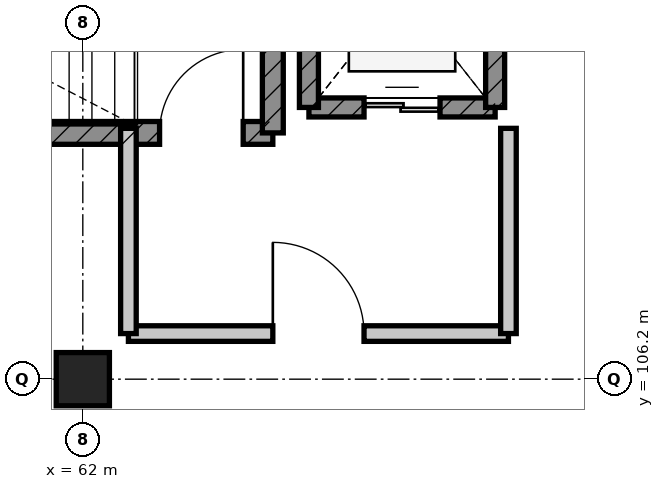
"""IFC4 building model, lengths in metres.
Left out: names, types, materials, properties, quantities, classifications, styles, units other than length and angle.
Written with IfcOpenShell. Run it as: python <this file> out.ifc"""

import sys

from ifc_helpers import new_model, si_unit, direction, frame, frame_2d, origin, origin_2d, place, context, subcontext, project, spatial, rectangle, extrude, element, fill, save


model = new_model("IFC4")
c1 = context("Model", 3, precision=1e-05, world=origin(), true_north=direction((0.0, 1.0)))
c2 = subcontext(c1, "Body", "Model", "MODEL_VIEW")
j1 = project(units=[si_unit("LENGTHUNIT", "METRE"), si_unit("PLANEANGLEUNIT", "RADIAN")], contexts=[c1])
p1 = place(None, origin())
s1 = spatial("IfcSite", under=j1, at=p1, CompositionType="ELEMENT")
p2 = place(p1, origin())
s2 = spatial("IfcBuilding", under=s1, at=p2, CompositionType="ELEMENT")
p3 = place(p2, frame((0.0, 0.0, 26.4)))
s3 = spatial("IfcBuildingStorey", under=s2, at=p3, CompositionType="ELEMENT", Elevation=26.4)
p4 = place(p3, frame((62.0, 106.2, 0.0), z_axis=(0.0, 0.0, 1.0), x_axis=(1.0, 0.0, 0.0)))
e1 = element("IfcColumn", 1, at=p4, inside=s3, PredefinedType="COLUMN", context=c2, shape_type="SweptSolid", body=[
    extrude(rectangle(XDim=0.7, YDim=0.7, at=origin_2d()), origin(), (0.0, 0.0, 1.0), 3.6),
])
p5 = place(p3, frame((56.1, 109.44, 0.0), z_axis=(0.0, 0.0, 1.0), x_axis=(1.0, 0.0, 0.0)))
e2 = element("IfcWall", 2, at=p5, inside=s3, PredefinedType="SHEAR", context=c2, shape_type="SweptSolid", body=[
    extrude(rectangle(XDim=8.4, YDim=0.3, at=frame_2d((4.2, 0.0))), origin(), (0.0, 0.0, 1.0), 3.35),
])
p6 = place(p5, frame((6.91, 0.0, 0.0)))
e3 = element("IfcOpeningElement", 3, at=p6, cuts=e2, PredefinedType="OPENING", context=c2, shape_type="SweptSolid", body=[
    extrude(rectangle(XDim=1.1, YDim=2.1, at=frame_2d((0.55, 1.05))), frame((0.0, 0.16, 0.0), z_axis=(0.0, -1.0, 0.0), x_axis=(1.0, 0.0, 0.0)), (0.0, 0.0, 1.0), 0.32),
])
p7 = place(p3, frame((64.5, 109.44, 0.0), z_axis=(0.0, 0.0, 1.0), x_axis=(0.0, 1.0, 0.0)))
e4 = element("IfcWall", 4, at=p7, inside=s3, PredefinedType="SHEAR", context=c2, shape_type="SweptSolid", body=[
    extrude(rectangle(XDim=3.56, YDim=0.275, at=frame_2d((1.78, 0.0))), origin(), (0.0, 0.0, 1.0), 3.35),
])
p8 = place(p3, frame((64.975, 109.775, 0.0), z_axis=(0.0, 0.0, 1.0), x_axis=(1.0, 0.0, 0.0)))
e5 = element("IfcWall", 5, at=p8, inside=s3, PredefinedType="SHEAR", context=c2, shape_type="SweptSolid", body=[
    extrude(rectangle(XDim=2.45, YDim=0.25, at=frame_2d((1.225, 0.0))), origin(), (0.0, 0.0, 1.0), 3.35),
])
p9 = place(p8, frame((0.725, 0.0, 0.0)))
e6 = element("IfcOpeningElement", 6, at=p9, cuts=e5, PredefinedType="OPENING", context=c2, shape_type="SweptSolid", body=[
    extrude(rectangle(XDim=1.0, YDim=2.15, at=frame_2d((0.5, 1.075))), frame((0.0, 0.135, 0.0), z_axis=(0.0, -1.0, 0.0), x_axis=(1.0, 0.0, 0.0)), (0.0, 0.0, 1.0), 0.27),
])
for number, where, z_axis, x_axis in (
    (7, (67.425, 109.775, 0.0), (0.0, 0.0, 1.0), (0.0, 1.0, 0.0)),
    (8, (64.975, 112.825, 0.0), (0.0, 0.0, 1.0), (0.0, -1.0, 0.0)),
):
    element("IfcWall", number, at=place(p3, frame(where, z_axis=z_axis, x_axis=x_axis)), inside=s3, PredefinedType="SHEAR", context=c2, shape_type="SweptSolid", body=[
        extrude(rectangle(XDim=3.05, YDim=0.25, at=frame_2d((1.525, 0.0))), origin(), (0.0, 0.0, 1.0), 3.35),
    ])
p10 = place(p3, frame((62.6, 106.8, 0.0), z_axis=(0.0, 0.0, 1.0), x_axis=(1.0, 0.0, 0.0)))
e9 = element("IfcWall", 9, at=p10, inside=s3, PredefinedType="PARTITIONING", context=c2, shape_type="SweptSolid", body=[
    extrude(rectangle(XDim=5.0, YDim=0.205, at=frame_2d((2.5, 0.0))), origin(), (0.0, 0.0, 1.0), 3.35),
])
p11 = place(p10, frame((1.9, 0.0, 0.0)))
e10 = element("IfcOpeningElement", 10, at=p11, cuts=e9, PredefinedType="OPENING", context=c2, shape_type="SweptSolid", body=[
    extrude(rectangle(XDim=1.2, YDim=2.1, at=frame_2d((0.6, 1.05))), frame((0.0, 0.113, 0.0), z_axis=(0.0, -1.0, 0.0), x_axis=(1.0, 0.0, 0.0)), (0.0, 0.0, 1.0), 0.225),
])
for number, where, z_axis, x_axis in (
    (11, (67.6, 106.8, 0.0), (0.0, 0.0, 1.0), (0.0, 1.0, 0.0)),
    (12, (62.6, 109.5, 0.0), (0.0, 0.0, 1.0), (0.0, -1.0, 0.0)),
):
    element("IfcWall", number, at=place(p3, frame(where, z_axis=z_axis, x_axis=x_axis)), inside=s3, PredefinedType="PARTITIONING", context=c2, shape_type="SweptSolid", body=[
        extrude(rectangle(XDim=2.7, YDim=0.205, at=frame_2d((1.35, 0.0))), origin(), (0.0, 0.0, 1.0), 3.35),
    ])
p12 = place(p6, origin())
e13 = element("IfcDoor", 13, at=p12, inside=s3, OperationType="SINGLE_SWING_RIGHT", PredefinedType="DOOR", context=c2, shape_type="SweptSolid", body=[
    extrude(rectangle(XDim=1.1, YDim=2.1, at=frame_2d((0.55, 1.05))), frame((0.0, 0.025, 0.0), z_axis=(0.0, -1.0, 0.0), x_axis=(1.0, 0.0, 0.0)), (0.0, 0.0, 1.0), 0.05),
])
fill(e3, e13)
p13 = place(p9, origin())
e14 = element("IfcDoor", 14, at=p13, inside=s3, OperationType="DOUBLE_DOOR_SLIDING", PredefinedType="DOOR", context=c2, shape_type="SweptSolid", body=[
    extrude(rectangle(XDim=1.0, YDim=2.15, at=frame_2d((0.5, 1.075))), frame((0.0, 0.025, 0.0), z_axis=(0.0, -1.0, 0.0), x_axis=(1.0, 0.0, 0.0)), (0.0, 0.0, 1.0), 0.05),
])
fill(e6, e14)
p14 = place(p11, origin())
e15 = element("IfcDoor", 15, at=p14, inside=s3, OperationType="SINGLE_SWING_LEFT", PredefinedType="DOOR", context=c2, shape_type="SweptSolid", body=[
    extrude(rectangle(XDim=1.2, YDim=2.1, at=frame_2d((0.6, 1.05))), frame((0.0, 0.025, 0.0), z_axis=(0.0, -1.0, 0.0), x_axis=(1.0, 0.0, 0.0)), (0.0, 0.0, 1.0), 0.05),
])
fill(e10, e15)
save(model, sys.argv[1])
